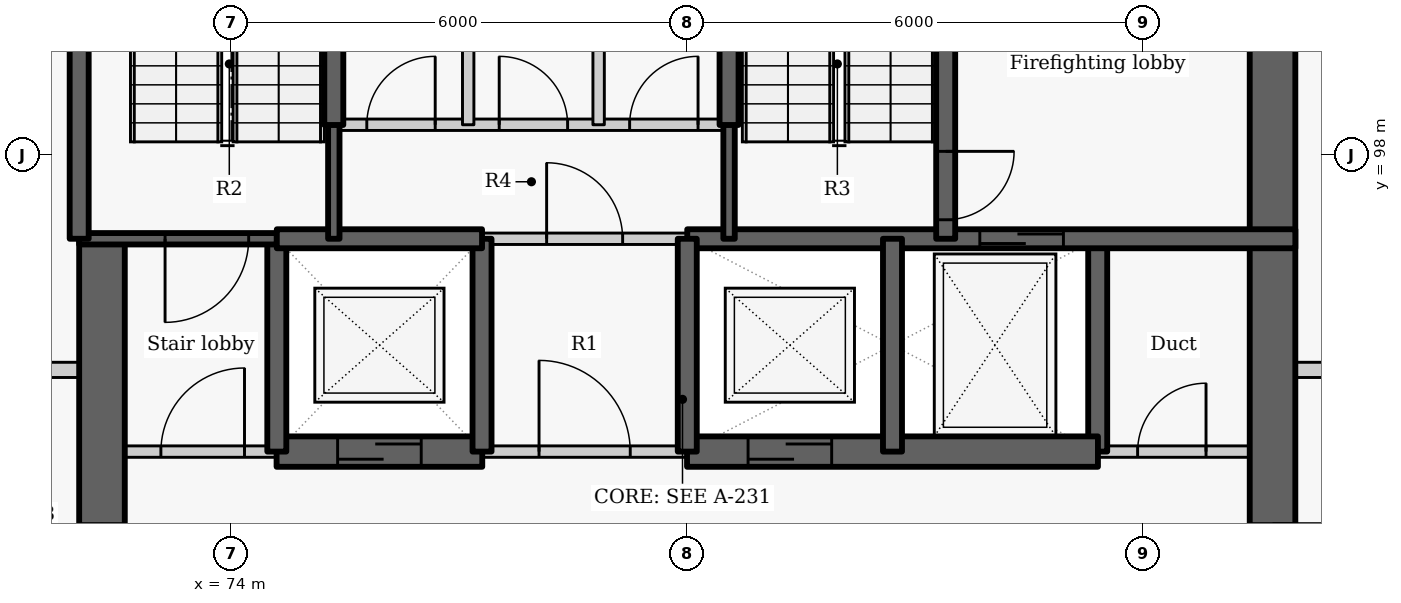
"""IFC4 building model, lengths in metres.
Left out: names, types, materials, properties, quantities, classifications, styles, units other than length and angle.
Written with IfcOpenShell. Run it as: python <this file> out.ifc"""

import sys

from ifc_helpers import new_model, si_unit, direction, frame, frame_2d, origin, place, context, subcontext, project, spatial, rectangle, extrude, element, fill, save


model = new_model("IFC4")
c1 = context("Model", 3, precision=1e-05, world=origin(), true_north=direction((0.0, 1.0)))
c2 = subcontext(c1, "Body", "Model", "MODEL_VIEW")
j1 = project(units=[si_unit("LENGTHUNIT", "METRE"), si_unit("PLANEANGLEUNIT", "RADIAN")], contexts=[c1])
p1 = place(None, origin())
s1 = spatial("IfcSite", under=j1, at=p1, CompositionType="ELEMENT")
p2 = place(p1, origin())
s2 = spatial("IfcBuilding", under=s1, at=p2, CompositionType="ELEMENT")
p3 = place(p2, frame((0.0, 0.0, 176.7)))
s3 = spatial("IfcBuildingStorey", under=s2, at=p3, CompositionType="ELEMENT", Elevation=176.7)
p4 = place(p3, frame((72.3, 87.8, -0.41), z_axis=(0.0, 0.0, 1.0), x_axis=(0.0, 1.0, 0.0)))
e1 = element("IfcWall", 1, at=p4, inside=s3, PredefinedType="SHEAR", context=c2, shape_type="SweptSolid", body=[
    extrude(rectangle(XDim=9.1, YDim=0.6, at=frame_2d((4.55, 0.0))), origin(), (0.0, 0.0, 1.0), 3.435),
])
p5 = place(p4, frame((3.852, 0.0, 0.41)))
e2 = element("IfcOpeningElement", 2, at=p5, cuts=e1, PredefinedType="OPENING", context=c2, shape_type="SweptSolid", body=[
    extrude(rectangle(XDim=1.5, YDim=2.1, at=frame_2d((0.75, 1.05))), frame((0.0, 0.31, 0.0), z_axis=(0.0, -1.0, 0.0), x_axis=(1.0, 0.0, 0.0)), (0.0, 0.0, 1.0), 0.62),
])
p6 = place(p3, frame((85.4, 94.1, -0.41), z_axis=(0.0, 0.0, 1.0), x_axis=(0.0, 1.0, 0.0)))
e3 = element("IfcWall", 3, at=p6, inside=s3, PredefinedType="SHEAR", context=c2, shape_type="SweptSolid", body=[
    extrude(rectangle(XDim=2.8, YDim=0.25, at=frame_2d((1.4, 0.0))), origin(), (0.0, 0.0, 1.0), 3.435),
])
p7 = place(p3, frame((87.7, 102.05, -0.41), z_axis=(0.0, 0.0, 1.0), x_axis=(0.0, -1.0, 0.0)))
e4 = element("IfcWall", 4, at=p7, inside=s3, PredefinedType="SHEAR", context=c2, shape_type="SweptSolid", body=[
    extrude(rectangle(XDim=14.25, YDim=0.6, at=frame_2d((7.125, 0.0))), origin(), (0.0, 0.0, 1.0), 3.435),
])
p8 = place(p7, frame((8.898, 0.0, 0.41)))
e5 = element("IfcOpeningElement", 5, at=p8, cuts=e4, PredefinedType="OPENING", context=c2, shape_type="SweptSolid", body=[
    extrude(rectangle(XDim=1.5, YDim=2.1, at=frame_2d((0.75, 1.05))), frame((0.0, 0.31, 0.0), z_axis=(0.0, -1.0, 0.0), x_axis=(1.0, 0.0, 0.0)), (0.0, 0.0, 1.0), 0.62),
])
p9 = place(p3, frame((72.0, 94.1, 0.0), z_axis=(0.0, 0.0, 1.0), x_axis=(1.0, 0.0, 0.0)))
e6 = element("IfcWall", 6, at=p9, inside=s3, PredefinedType="PARTITIONING", context=c2, shape_type="SweptSolid", body=[
    extrude(rectangle(XDim=2.603, YDim=0.15, at=frame_2d((1.302, 0.0))), origin(), (0.0, 0.0, 1.0), 3.025),
])
p10 = place(p9, frame((1.075, 0.0, 0.0)))
e7 = element("IfcOpeningElement", 7, at=p10, cuts=e6, PredefinedType="OPENING", context=c2, shape_type="SweptSolid", body=[
    extrude(rectangle(XDim=1.1, YDim=2.1, at=frame_2d((0.55, 1.05))), frame((0.0, 0.085, 0.0), z_axis=(0.0, -1.0, 0.0), x_axis=(1.0, 0.0, 0.0)), (0.0, 0.0, 1.0), 0.17),
])
p11 = place(p3, frame((77.297, 94.1, 0.0), z_axis=(0.0, 0.0, 1.0), x_axis=(1.0, 0.0, 0.0)))
e8 = element("IfcWall", 8, at=p11, inside=s3, PredefinedType="PARTITIONING", context=c2, shape_type="SweptSolid", body=[
    extrude(rectangle(XDim=2.706, YDim=0.15, at=frame_2d((1.353, 0.0))), origin(), (0.0, 0.0, 1.0), 3.025),
])
p12 = place(p11, frame((0.753, 0.0, 0.0)))
e9 = element("IfcOpeningElement", 9, at=p12, cuts=e8, PredefinedType="OPENING", context=c2, shape_type="SweptSolid", body=[
    extrude(rectangle(XDim=1.2, YDim=2.1, at=frame_2d((0.6, 1.05))), frame((0.0, 0.085, 0.0), z_axis=(0.0, -1.0, 0.0), x_axis=(1.0, 0.0, 0.0)), (0.0, 0.0, 1.0), 0.17),
])
p13 = place(p3, frame((85.397, 94.1, 0.0), z_axis=(0.0, 0.0, 1.0), x_axis=(1.0, 0.0, 0.0)))
e10 = element("IfcWall", 10, at=p13, inside=s3, PredefinedType="PARTITIONING", context=c2, shape_type="SweptSolid", body=[
    extrude(rectangle(XDim=2.603, YDim=0.15, at=frame_2d((1.302, 0.0))), origin(), (0.0, 0.0, 1.0), 3.025),
])
p14 = place(p13, frame((0.528, 0.0, 0.0)))
e11 = element("IfcOpeningElement", 11, at=p14, cuts=e10, PredefinedType="OPENING", context=c2, shape_type="SweptSolid", body=[
    extrude(rectangle(XDim=0.9, YDim=2.1, at=frame_2d((0.45, 1.05))), frame((0.0, 0.085, 0.0), z_axis=(0.0, -1.0, 0.0), x_axis=(1.0, 0.0, 0.0)), (0.0, 0.0, 1.0), 0.17),
])
p15 = place(p3, frame((74.597, 94.1, -0.41), z_axis=(0.0, 0.0, 1.0), x_axis=(1.0, 0.0, 0.0)))
e12 = element("IfcWall", 12, at=p15, inside=s3, PredefinedType="SHEAR", context=c2, shape_type="SweptSolid", body=[
    extrude(rectangle(XDim=2.706, YDim=0.4, at=frame_2d((1.353, 0.0))), origin(), (0.0, 0.0, 1.0), 3.435),
])
p16 = place(p15, frame((0.803, 0.0, 0.41)))
e13 = element("IfcOpeningElement", 13, at=p16, cuts=e12, PredefinedType="OPENING", context=c2, shape_type="SweptSolid", body=[
    extrude(rectangle(XDim=1.1, YDim=2.1, at=frame_2d((0.55, 1.05))), frame((0.0, 0.21, 0.0), z_axis=(0.0, -1.0, 0.0), x_axis=(1.0, 0.0, 0.0)), (0.0, 0.0, 1.0), 0.42),
])
p17 = place(p3, frame((79.997, 94.1, -0.41), z_axis=(0.0, 0.0, 1.0), x_axis=(1.0, 0.0, 0.0)))
e14 = element("IfcWall", 14, at=p17, inside=s3, PredefinedType="SHEAR", context=c2, shape_type="SweptSolid", body=[
    extrude(rectangle(XDim=5.406, YDim=0.4, at=frame_2d((2.703, 0.0))), origin(), (0.0, 0.0, 1.0), 3.435),
])
p18 = place(p17, frame((0.803, 0.0, 0.41)))
e15 = element("IfcOpeningElement", 15, at=p18, cuts=e14, PredefinedType="OPENING", context=c2, shape_type="SweptSolid", body=[
    extrude(rectangle(XDim=1.1, YDim=2.1, at=frame_2d((0.55, 1.05))), frame((0.0, 0.21, 0.0), z_axis=(0.0, -1.0, 0.0), x_axis=(1.0, 0.0, 0.0)), (0.0, 0.0, 1.0), 0.42),
])
p19 = place(p3, frame((74.6, 94.1, -0.41), z_axis=(0.0, 0.0, 1.0), x_axis=(0.0, 1.0, 0.0)))
e16 = element("IfcWall", 16, at=p19, inside=s3, PredefinedType="SHEAR", context=c2, shape_type="SweptSolid", body=[
    extrude(rectangle(XDim=2.8, YDim=0.25, at=frame_2d((1.4, 0.0))), origin(), (0.0, 0.0, 1.0), 3.435),
])
p20 = place(p3, frame((74.6, 96.9, -0.41), z_axis=(0.0, 0.0, 1.0), x_axis=(-1.0, 0.0, 0.0)))
e17 = element("IfcWall", 17, at=p20, inside=s3, PredefinedType="SHEAR", context=c2, shape_type="SweptSolid", body=[
    extrude(rectangle(XDim=2.6, YDim=0.15, at=frame_2d((1.3, 0.0))), origin(), (0.0, 0.0, 1.0), 3.435),
])
p21 = place(p20, frame((0.37, 0.0, 0.41)))
e18 = element("IfcOpeningElement", 18, at=p21, cuts=e17, PredefinedType="OPENING", context=c2, shape_type="SweptSolid", body=[
    extrude(rectangle(XDim=1.1, YDim=2.1, at=frame_2d((0.55, 1.05))), frame((0.0, 0.085, 0.0), z_axis=(0.0, -1.0, 0.0), x_axis=(1.0, 0.0, 0.0)), (0.0, 0.0, 1.0), 0.17),
])
p22 = place(p3, frame((77.3, 94.1, -0.41), z_axis=(0.0, 0.0, 1.0), x_axis=(0.0, 1.0, 0.0)))
e19 = element("IfcWall", 19, at=p22, inside=s3, PredefinedType="SHEAR", context=c2, shape_type="SweptSolid", body=[
    extrude(rectangle(XDim=2.8, YDim=0.25, at=frame_2d((1.4, 0.0))), origin(), (0.0, 0.0, 1.0), 3.435),
])
p23 = place(p3, frame((74.6, 96.9, -0.41), z_axis=(0.0, 0.0, 1.0), x_axis=(1.0, 0.0, 0.0)))
e20 = element("IfcWall", 20, at=p23, inside=s3, PredefinedType="SHEAR", context=c2, shape_type="SweptSolid", body=[
    extrude(rectangle(XDim=2.7, YDim=0.25, at=frame_2d((1.35, 0.0))), origin(), (0.0, 0.0, 1.0), 3.435),
])
p24 = place(p3, frame((80.0, 96.9, -0.41), z_axis=(0.0, 0.0, 1.0), x_axis=(1.0, 0.0, 0.0)))
e21 = element("IfcWall", 21, at=p24, inside=s3, PredefinedType="SHEAR", context=c2, shape_type="SweptSolid", body=[
    extrude(rectangle(XDim=8.0, YDim=0.25, at=frame_2d((4.0, 0.0))), origin(), (0.0, 0.0, 1.0), 3.435),
])
p25 = place(p24, frame((3.849, 0.0, 0.41)))
e22 = element("IfcOpeningElement", 22, at=p25, cuts=e21, PredefinedType="OPENING", context=c2, shape_type="SweptSolid", body=[
    extrude(rectangle(XDim=1.1, YDim=2.1, at=frame_2d((0.55, 1.05))), frame((0.0, 0.135, 0.0), z_axis=(0.0, -1.0, 0.0), x_axis=(1.0, 0.0, 0.0)), (0.0, 0.0, 1.0), 0.27),
])
p26 = place(p3, frame((80.0, 94.1, -0.41), z_axis=(0.0, 0.0, 1.0), x_axis=(0.0, 1.0, 0.0)))
e23 = element("IfcWall", 23, at=p26, inside=s3, PredefinedType="SHEAR", context=c2, shape_type="SweptSolid", body=[
    extrude(rectangle(XDim=2.8, YDim=0.25, at=frame_2d((1.4, 0.0))), origin(), (0.0, 0.0, 1.0), 3.435),
])
p27 = place(p3, frame((77.3, 96.9, 0.0), z_axis=(0.0, 0.0, 1.0), x_axis=(1.0, 0.0, 0.0)))
e24 = element("IfcWall", 24, at=p27, inside=s3, PredefinedType="PARTITIONING", context=c2, shape_type="SweptSolid", body=[
    extrude(rectangle(XDim=2.7, YDim=0.15, at=frame_2d((1.35, 0.0))), origin(), (0.0, 0.0, 1.0), 3.025),
])
p28 = place(p27, frame((0.85, 0.0, 0.0)))
e25 = element("IfcOpeningElement", 25, at=p28, cuts=e24, PredefinedType="OPENING", context=c2, shape_type="SweptSolid", body=[
    extrude(rectangle(XDim=1.0, YDim=2.1, at=frame_2d((0.5, 1.05))), frame((0.0, 0.085, 0.0), z_axis=(0.0, -1.0, 0.0), x_axis=(1.0, 0.0, 0.0)), (0.0, 0.0, 1.0), 0.17),
])
p29 = place(p3, frame((82.7, 94.1, -0.41), z_axis=(0.0, 0.0, 1.0), x_axis=(0.0, 1.0, 0.0)))
e26 = element("IfcWall", 26, at=p29, inside=s3, PredefinedType="SHEAR", context=c2, shape_type="SweptSolid", body=[
    extrude(rectangle(XDim=2.8, YDim=0.25, at=frame_2d((1.4, 0.0))), origin(), (0.0, 0.0, 1.0), 3.435),
])
p30 = place(p3, frame((75.35, 96.9, -0.41), z_axis=(0.0, 0.0, 1.0), x_axis=(0.0, 1.0, 0.0)))
e27 = element("IfcWall", 27, at=p30, inside=s3, PredefinedType="SHEAR", context=c2, shape_type="SweptSolid", body=[
    extrude(rectangle(XDim=1.503, YDim=0.15, at=frame_2d((0.751, 0.0))), origin(), (0.0, 0.0, 1.0), 3.435),
])
p31 = place(p3, frame((75.35, 98.397, -0.41), z_axis=(0.0, 0.0, 1.0), x_axis=(0.0, 1.0, 0.0)))
e28 = element("IfcWall", 28, at=p31, inside=s3, PredefinedType="SHEAR", context=c2, shape_type="SweptSolid", body=[
    extrude(rectangle(XDim=3.653, YDim=0.25, at=frame_2d((1.827, 0.0))), origin(), (0.0, 0.0, 1.0), 3.435),
])
p32 = place(p3, frame((72.0, 96.9, -0.41), z_axis=(0.0, 0.0, 1.0), x_axis=(0.0, 1.0, 0.0)))
e29 = element("IfcWall", 29, at=p32, inside=s3, PredefinedType="SHEAR", context=c2, shape_type="SweptSolid", body=[
    extrude(rectangle(XDim=5.15, YDim=0.25, at=frame_2d((2.575, 0.0))), origin(), (0.0, 0.0, 1.0), 3.435),
])
p33 = place(p3, frame((83.4, 102.05, -0.41), z_axis=(0.0, 0.0, 1.0), x_axis=(0.0, -1.0, 0.0)))
e30 = element("IfcWall", 30, at=p33, inside=s3, PredefinedType="SHEAR", context=c2, shape_type="SweptSolid", body=[
    extrude(rectangle(XDim=5.15, YDim=0.25, at=frame_2d((2.575, 0.0))), origin(), (0.0, 0.0, 1.0), 3.435),
])
p34 = place(p33, frame((4.0, 0.0, 0.41)))
e31 = element("IfcOpeningElement", 31, at=p34, cuts=e30, PredefinedType="OPENING", context=c2, shape_type="SweptSolid", body=[
    extrude(rectangle(XDim=0.9, YDim=2.1, at=frame_2d((0.45, 1.05))), frame((0.0, 0.135, 0.0), z_axis=(0.0, -1.0, 0.0), x_axis=(1.0, 0.0, 0.0)), (0.0, 0.0, 1.0), 0.27),
])
p35 = place(p3, frame((80.55, 96.9, -0.41), z_axis=(0.0, 0.0, 1.0), x_axis=(0.0, 1.0, 0.0)))
e32 = element("IfcWall", 32, at=p35, inside=s3, PredefinedType="SHEAR", context=c2, shape_type="SweptSolid", body=[
    extrude(rectangle(XDim=1.503, YDim=0.15, at=frame_2d((0.751, 0.0))), origin(), (0.0, 0.0, 1.0), 3.435),
])
p36 = place(p3, frame((80.55, 98.397, -0.41), z_axis=(0.0, 0.0, 1.0), x_axis=(0.0, 1.0, 0.0)))
e33 = element("IfcWall", 33, at=p36, inside=s3, PredefinedType="SHEAR", context=c2, shape_type="SweptSolid", body=[
    extrude(rectangle(XDim=3.653, YDim=0.25, at=frame_2d((1.827, 0.0))), origin(), (0.0, 0.0, 1.0), 3.435),
])
p37 = place(p3, frame((75.35, 98.4, 0.0), z_axis=(0.0, 0.0, 1.0), x_axis=(1.0, 0.0, 0.0)))
e34 = element("IfcWall", 34, at=p37, inside=s3, PredefinedType="PARTITIONING", context=c2, shape_type="SweptSolid", body=[
    extrude(rectangle(XDim=5.2, YDim=0.15, at=frame_2d((2.6, 0.0))), origin(), (0.0, 0.0, 1.0), 3.025),
])
p38 = place(p37, frame((0.434, 0.0, 0.0)))
e35 = element("IfcOpeningElement", 35, at=p38, cuts=e34, PredefinedType="OPENING", context=c2, shape_type="SweptSolid", body=[
    extrude(rectangle(XDim=0.9, YDim=2.1, at=frame_2d((0.45, 1.05))), frame((0.0, 0.085, 0.0), z_axis=(0.0, -1.0, 0.0), x_axis=(1.0, 0.0, 0.0)), (0.0, 0.0, 1.0), 0.17),
])
p39 = place(p37, frame((2.176, 0.0, 0.0)))
e36 = element("IfcOpeningElement", 36, at=p39, cuts=e34, PredefinedType="OPENING", context=c2, shape_type="SweptSolid", body=[
    extrude(rectangle(XDim=0.9, YDim=2.1, at=frame_2d((0.45, 1.05))), frame((0.0, 0.085, 0.0), z_axis=(0.0, -1.0, 0.0), x_axis=(1.0, 0.0, 0.0)), (0.0, 0.0, 1.0), 0.17),
])
p40 = place(p37, frame((3.892, 0.0, 0.0)))
e37 = element("IfcOpeningElement", 37, at=p40, cuts=e34, PredefinedType="OPENING", context=c2, shape_type="SweptSolid", body=[
    extrude(rectangle(XDim=0.9, YDim=2.1, at=frame_2d((0.45, 1.05))), frame((0.0, 0.085, 0.0), z_axis=(0.0, -1.0, 0.0), x_axis=(1.0, 0.0, 0.0)), (0.0, 0.0, 1.0), 0.17),
])
for number, where, z_axis, x_axis in (
    (38, (77.118, 98.4, 0.0), (0.0, 0.0, 1.0), (0.0, 1.0, 0.0)),
    (39, (78.834, 98.4, 0.0), (0.0, 0.0, 1.0), (0.0, 1.0, 0.0)),
):
    element("IfcWall", number, at=place(p3, frame(where, z_axis=z_axis, x_axis=x_axis)), inside=s3, PredefinedType="PARTITIONING", context=c2, shape_type="SweptSolid", body=[
        extrude(rectangle(XDim=3.65, YDim=0.15, at=frame_2d((1.825, 0.0))), origin(), (0.0, 0.0, 1.0), 3.025),
    ])
p41 = place(p3, frame((69.587, 95.175, 0.0), z_axis=(0.0, 0.0, 1.0), x_axis=(1.0, 0.0, 0.0)))
e40 = element("IfcWall", 40, at=p41, inside=s3, PredefinedType="PARTITIONING", context=c2, shape_type="SweptSolid", body=[
    extrude(rectangle(XDim=2.413, YDim=0.2, at=frame_2d((1.207, 0.0))), origin(), (0.0, 0.0, 1.0), 2.505),
])
p42 = place(p3, frame((88.0, 95.175, 0.0), z_axis=(0.0, 0.0, 1.0), x_axis=(1.0, 0.0, 0.0)))
e41 = element("IfcWall", 41, at=p42, inside=s3, PredefinedType="PARTITIONING", context=c2, shape_type="SweptSolid", body=[
    extrude(rectangle(XDim=1.473, YDim=0.2, at=frame_2d((0.736, 0.0))), origin(), (0.0, 0.0, 1.0), 3.025),
])
p43 = place(p10, origin())
e42 = element("IfcDoor", 42, at=p43, inside=s3, OperationType="SINGLE_SWING_RIGHT", PredefinedType="DOOR", context=c2, shape_type="SweptSolid", body=[
    extrude(rectangle(XDim=1.1, YDim=2.1, at=frame_2d((0.55, 1.05))), frame((0.0, 0.025, 0.0), z_axis=(0.0, -1.0, 0.0), x_axis=(1.0, 0.0, 0.0)), (0.0, 0.0, 1.0), 0.05),
])
fill(e7, e42)
p44 = place(p16, origin())
e43 = element("IfcDoor", 43, at=p44, inside=s3, OperationType="SLIDING_TO_LEFT", PredefinedType="DOOR", context=c2, shape_type="SweptSolid", body=[
    extrude(rectangle(XDim=1.1, YDim=2.1, at=frame_2d((0.55, 1.05))), frame((0.0, 0.025, 0.0), z_axis=(0.0, -1.0, 0.0), x_axis=(1.0, 0.0, 0.0)), (0.0, 0.0, 1.0), 0.05),
])
fill(e13, e43)
p45 = place(p12, origin())
e44 = element("IfcDoor", 44, at=p45, inside=s3, OperationType="DOUBLE_DOOR_SINGLE_SWING", PredefinedType="DOOR", context=c2, shape_type="SweptSolid", body=[
    extrude(rectangle(XDim=1.2, YDim=2.1, at=frame_2d((0.6, 1.05))), frame((0.0, 0.025, 0.0), z_axis=(0.0, -1.0, 0.0), x_axis=(1.0, 0.0, 0.0)), (0.0, 0.0, 1.0), 0.05),
])
fill(e9, e44)
p46 = place(p18, origin())
e45 = element("IfcDoor", 45, at=p46, inside=s3, OperationType="SLIDING_TO_LEFT", PredefinedType="DOOR", context=c2, shape_type="SweptSolid", body=[
    extrude(rectangle(XDim=1.1, YDim=2.1, at=frame_2d((0.55, 1.05))), frame((0.0, 0.025, 0.0), z_axis=(0.0, -1.0, 0.0), x_axis=(1.0, 0.0, 0.0)), (0.0, 0.0, 1.0), 0.05),
])
fill(e15, e45)
p47 = place(p25, origin())
e46 = element("IfcDoor", 46, at=p47, inside=s3, OperationType="SLIDING_TO_LEFT", PredefinedType="DOOR", context=c2, shape_type="SweptSolid", body=[
    extrude(rectangle(XDim=1.1, YDim=2.1, at=frame_2d((0.55, 1.05))), frame((0.0, 0.025, 0.0), z_axis=(0.0, -1.0, 0.0), x_axis=(1.0, 0.0, 0.0)), (0.0, 0.0, 1.0), 0.05),
])
fill(e22, e46)
p48 = place(p14, origin())
e47 = element("IfcDoor", 47, at=p48, inside=s3, OperationType="SINGLE_SWING_RIGHT", PredefinedType="DOOR", context=c2, shape_type="SweptSolid", body=[
    extrude(rectangle(XDim=0.9, YDim=2.1, at=frame_2d((0.45, 1.05))), frame((0.0, 0.025, 0.0), z_axis=(0.0, -1.0, 0.0), x_axis=(1.0, 0.0, 0.0)), (0.0, 0.0, 1.0), 0.05),
])
fill(e11, e47)
p49 = place(p28, origin())
e48 = element("IfcDoor", 48, at=p49, inside=s3, OperationType="SINGLE_SWING_LEFT", PredefinedType="DOOR", context=c2, shape_type="SweptSolid", body=[
    extrude(rectangle(XDim=1.0, YDim=2.1, at=frame_2d((0.5, 1.05))), frame((0.0, 0.025, 0.0), z_axis=(0.0, -1.0, 0.0), x_axis=(1.0, 0.0, 0.0)), (0.0, 0.0, 1.0), 0.05),
])
fill(e25, e48)
p50 = place(p38, origin())
e49 = element("IfcDoor", 49, at=p50, inside=s3, OperationType="SINGLE_SWING_RIGHT", PredefinedType="DOOR", context=c2, shape_type="SweptSolid", body=[
    extrude(rectangle(XDim=0.9, YDim=2.1, at=frame_2d((0.45, 1.05))), frame((0.0, 0.025, 0.0), z_axis=(0.0, -1.0, 0.0), x_axis=(1.0, 0.0, 0.0)), (0.0, 0.0, 1.0), 0.05),
])
fill(e35, e49)
p51 = place(p39, origin())
e50 = element("IfcDoor", 50, at=p51, inside=s3, OperationType="SINGLE_SWING_LEFT", PredefinedType="DOOR", context=c2, shape_type="SweptSolid", body=[
    extrude(rectangle(XDim=0.9, YDim=2.1, at=frame_2d((0.45, 1.05))), frame((0.0, 0.025, 0.0), z_axis=(0.0, -1.0, 0.0), x_axis=(1.0, 0.0, 0.0)), (0.0, 0.0, 1.0), 0.05),
])
fill(e36, e50)
p52 = place(p40, origin())
e51 = element("IfcDoor", 51, at=p52, inside=s3, OperationType="SINGLE_SWING_RIGHT", PredefinedType="DOOR", context=c2, shape_type="SweptSolid", body=[
    extrude(rectangle(XDim=0.9, YDim=2.1, at=frame_2d((0.45, 1.05))), frame((0.0, 0.025, 0.0), z_axis=(0.0, -1.0, 0.0), x_axis=(1.0, 0.0, 0.0)), (0.0, 0.0, 1.0), 0.05),
])
fill(e37, e51)
p53 = place(p21, origin())
e52 = element("IfcDoor", 52, at=p53, inside=s3, OperationType="SINGLE_SWING_RIGHT", PredefinedType="DOOR", context=c2, shape_type="SweptSolid", body=[
    extrude(rectangle(XDim=1.1, YDim=2.1, at=frame_2d((0.55, 1.05))), frame((0.0, 0.025, 0.0), z_axis=(0.0, -1.0, 0.0), x_axis=(1.0, 0.0, 0.0)), (0.0, 0.0, 1.0), 0.05),
])
fill(e18, e52)
p54 = place(p34, origin())
e53 = element("IfcDoor", 53, at=p54, inside=s3, OperationType="SINGLE_SWING_LEFT", PredefinedType="DOOR", context=c2, shape_type="SweptSolid", body=[
    extrude(rectangle(XDim=0.9, YDim=2.1, at=frame_2d((0.45, 1.05))), frame((0.0, 0.025, 0.0), z_axis=(0.0, -1.0, 0.0), x_axis=(1.0, 0.0, 0.0)), (0.0, 0.0, 1.0), 0.05),
])
fill(e31, e53)
p55 = place(p8, origin())
e54 = element("IfcDoor", 54, at=p55, inside=s3, OperationType="DOUBLE_DOOR_SINGLE_SWING", PredefinedType="DOOR", context=c2, shape_type="SweptSolid", body=[
    extrude(rectangle(XDim=1.5, YDim=2.1, at=frame_2d((0.75, 1.05))), frame((0.0, 0.025, 0.0), z_axis=(0.0, -1.0, 0.0), x_axis=(1.0, 0.0, 0.0)), (0.0, 0.0, 1.0), 0.05),
])
fill(e5, e54)
p56 = place(p5, origin())
e55 = element("IfcDoor", 55, at=p56, inside=s3, OperationType="DOUBLE_DOOR_SINGLE_SWING", PredefinedType="DOOR", context=c2, shape_type="SweptSolid", body=[
    extrude(rectangle(XDim=1.5, YDim=2.1, at=frame_2d((0.75, 1.05))), frame((0.0, 0.025, 0.0), z_axis=(0.0, -1.0, 0.0), x_axis=(1.0, 0.0, 0.0)), (0.0, 0.0, 1.0), 0.05),
])
fill(e2, e55)
save(model, sys.argv[1])
